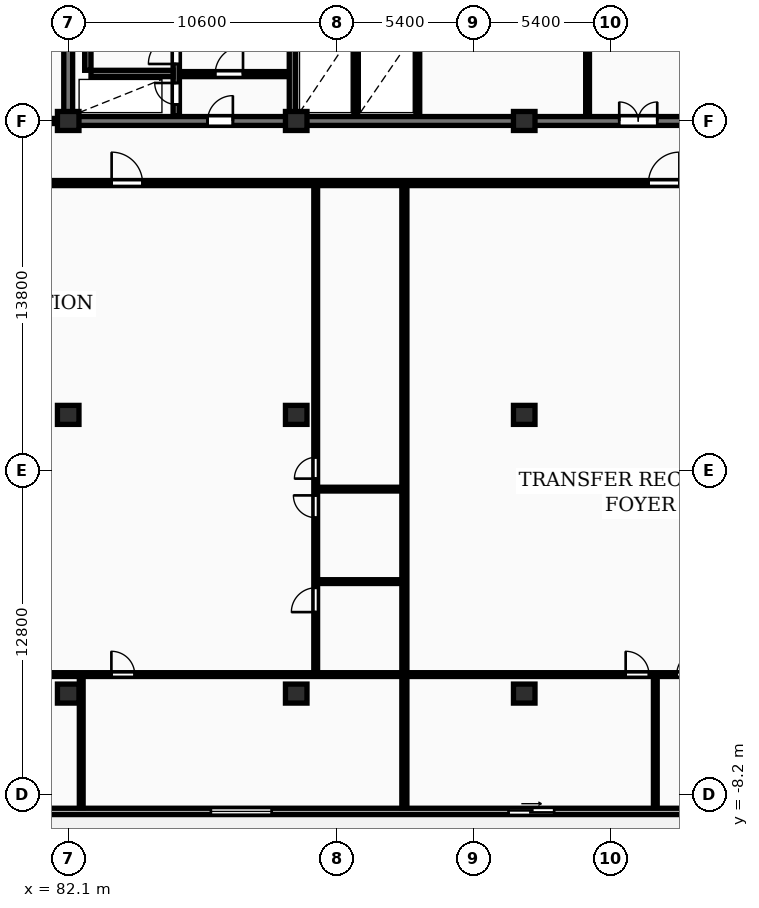
"""IFC4 building model, lengths in metres.
Left out: names, types, materials, properties, quantities, classifications, styles, units other than length and angle.
Written with IfcOpenShell. Run it as: python <this file> out.ifc"""

import sys

from ifc_helpers import new_model, si_unit, direction, frame, frame_2d, origin, origin_2d, place, context, subcontext, project, spatial, rectangle, extrude, element, fill, save


model = new_model("IFC4")
c1 = context("Model", 3, precision=1e-05, world=origin(), true_north=direction((0.0, 1.0)))
c2 = subcontext(c1, "Body", "Model", "MODEL_VIEW")
j1 = project(units=[si_unit("LENGTHUNIT", "METRE"), si_unit("PLANEANGLEUNIT", "RADIAN")], contexts=[c1])
p1 = place(None, origin())
s1 = spatial("IfcSite", under=j1, at=p1, CompositionType="ELEMENT")
p2 = place(p1, origin())
s2 = spatial("IfcBuilding", under=s1, at=p2, CompositionType="ELEMENT")
p3 = place(p2, frame((0.0, 0.0, 93.8)))
s3 = spatial("IfcBuildingStorey", under=s2, at=p3, CompositionType="ELEMENT", Elevation=93.8)
for number, where, z_axis, x_axis in (
    (1, (82.1, -4.2, 0.0), (0.0, 0.0, 1.0), (1.0, 0.0, 0.0)),
    (2, (82.1, 6.8, 0.0), (0.0, 0.0, 1.0), (1.0, 0.0, 0.0)),
    (3, (82.1, 18.4, 0.0), (0.0, 0.0, 1.0), (1.0, 0.0, 0.0)),
    (4, (91.1, -4.2, 0.0), (0.0, 0.0, 1.0), (1.0, 0.0, 0.0)),
    (5, (91.1, 6.8, 0.0), (0.0, 0.0, 1.0), (1.0, 0.0, 0.0)),
    (6, (91.1, 18.4, 0.0), (0.0, 0.0, 1.0), (1.0, 0.0, 0.0)),
    (7, (100.1, -4.2, 0.0), (0.0, 0.0, 1.0), (1.0, 0.0, 0.0)),
    (8, (100.1, 6.8, 0.0), (0.0, 0.0, 1.0), (1.0, 0.0, 0.0)),
    (9, (100.1, 18.4, 0.0), (0.0, 0.0, 1.0), (1.0, 0.0, 0.0)),
):
    element("IfcColumn", number, at=place(p3, frame(where, z_axis=z_axis, x_axis=x_axis)), inside=s3, PredefinedType="COLUMN", context=c2, shape_type="SweptSolid", body=[
        extrude(rectangle(XDim=0.85, YDim=0.75, at=origin_2d()), origin(), (0.0, 0.0, 1.0), 3.25),
    ])
p4 = place(p3, frame((72.7, -8.85, 0.0), z_axis=(0.0, 0.0, 1.0), x_axis=(1.0, 0.0, 0.0)))
e10 = element("IfcWall", 10, at=p4, inside=s3, PredefinedType="STANDARD", context=c2, shape_type="SweptSolid", body=[
    extrude(rectangle(XDim=58.0, YDim=0.25, at=frame_2d((29.0, 0.0))), origin(), (0.0, 0.0, 1.0), 2.97),
])
p5 = place(p4, frame((4.117, 0.0, 0.0)))
e11 = element("IfcOpeningElement", 11, at=p5, cuts=e10, PredefinedType="OPENING", context=c2, shape_type="SweptSolid", body=[
    extrude(rectangle(XDim=1.8, YDim=2.2, at=frame_2d((0.9, 1.1))), frame((0.0, 0.135, 0.0), z_axis=(0.0, -1.0, 0.0), x_axis=(1.0, 0.0, 0.0)), (0.0, 0.0, 1.0), 0.27),
])
p6 = place(p4, frame((15.032, 0.0, 0.85)))
e12 = element("IfcOpeningElement", 12, at=p6, cuts=e10, PredefinedType="OPENING", context=c2, shape_type="SweptSolid", body=[
    extrude(rectangle(XDim=2.4, YDim=1.9, at=frame_2d((1.2, 0.95))), frame((0.0, 0.135, 0.0), z_axis=(0.0, -1.0, 0.0), x_axis=(1.0, 0.0, 0.0)), (0.0, 0.0, 1.0), 0.27),
])
p7 = place(p4, frame((26.781, 0.0, 0.0)))
e13 = element("IfcOpeningElement", 13, at=p7, cuts=e10, PredefinedType="OPENING", context=c2, shape_type="SweptSolid", body=[
    extrude(rectangle(XDim=1.8, YDim=2.2, at=frame_2d((0.9, 1.1))), frame((0.0, 0.135, 0.0), z_axis=(0.0, -1.0, 0.0), x_axis=(1.0, 0.0, 0.0)), (0.0, 0.0, 1.0), 0.27),
])
p8 = place(p4, frame((37.571, 0.0, 0.85)))
e14 = element("IfcOpeningElement", 14, at=p8, cuts=e10, PredefinedType="OPENING", context=c2, shape_type="SweptSolid", body=[
    extrude(rectangle(XDim=2.4, YDim=1.9, at=frame_2d((1.2, 0.95))), frame((0.0, 0.135, 0.0), z_axis=(0.0, -1.0, 0.0), x_axis=(1.0, 0.0, 0.0)), (0.0, 0.0, 1.0), 0.27),
])
p9 = place(p4, frame((48.864, 0.0, 0.0)))
e15 = element("IfcOpeningElement", 15, at=p9, cuts=e10, PredefinedType="OPENING", context=c2, shape_type="SweptSolid", body=[
    extrude(rectangle(XDim=1.8, YDim=2.2, at=frame_2d((0.9, 1.1))), frame((0.0, 0.135, 0.0), z_axis=(0.0, -1.0, 0.0), x_axis=(1.0, 0.0, 0.0)), (0.0, 0.0, 1.0), 0.27),
])
p10 = place(p4, frame((54.9, 0.0, 0.85)))
e16 = element("IfcOpeningElement", 16, at=p10, cuts=e10, PredefinedType="OPENING", context=c2, shape_type="SweptSolid", body=[
    extrude(rectangle(XDim=2.4, YDim=1.9, at=frame_2d((1.2, 0.95))), frame((0.0, 0.135, 0.0), z_axis=(0.0, -1.0, 0.0), x_axis=(1.0, 0.0, 0.0)), (0.0, 0.0, 1.0), 0.27),
])
p11 = place(p3, frame((82.1, 18.575, 0.0), z_axis=(0.0, 0.0, 1.0), x_axis=(0.0, 1.0, 0.0)))
e17 = element("IfcWall", 17, at=p11, inside=s3, PredefinedType="SHEAR", context=c2, shape_type="SweptSolid", body=[
    extrude(rectangle(XDim=11.65, YDim=0.35, at=frame_2d((5.825, 0.0))), origin(), (0.0, 0.0, 1.0), 3.25),
])
p12 = place(p3, frame((81.925, 18.4, 0.0), z_axis=(0.0, 0.0, 1.0), x_axis=(1.0, 0.0, 0.0)))
e18 = element("IfcWall", 18, at=p12, inside=s3, PredefinedType="SHEAR", context=c2, shape_type="SweptSolid", body=[
    extrude(rectangle(XDim=36.265, YDim=0.35, at=frame_2d((18.132, 0.0))), origin(), (0.0, 0.0, 1.0), 3.25),
])
p13 = place(p12, frame((5.675, 0.0, 0.0)))
e19 = element("IfcOpeningElement", 19, at=p13, cuts=e18, PredefinedType="OPENING", context=c2, shape_type="SweptSolid", body=[
    extrude(rectangle(XDim=1.0, YDim=2.15, at=frame_2d((0.5, 1.075))), frame((0.0, 0.185, 0.0), z_axis=(0.0, -1.0, 0.0), x_axis=(1.0, 0.0, 0.0)), (0.0, 0.0, 1.0), 0.37),
])
p14 = place(p12, frame((21.925, 0.0, 0.0)))
e20 = element("IfcOpeningElement", 20, at=p14, cuts=e18, PredefinedType="OPENING", context=c2, shape_type="SweptSolid", body=[
    extrude(rectangle(XDim=1.5, YDim=2.2, at=frame_2d((0.75, 1.1))), frame((0.0, 0.185, 0.0), z_axis=(0.0, -1.0, 0.0), x_axis=(1.0, 0.0, 0.0)), (0.0, 0.0, 1.0), 0.37),
])
p15 = place(p12, frame((29.875, 0.0, 0.0)))
e21 = element("IfcOpeningElement", 21, at=p15, cuts=e18, PredefinedType="OPENING", context=c2, shape_type="SweptSolid", body=[
    extrude(rectangle(XDim=1.0, YDim=2.15, at=frame_2d((0.5, 1.075))), frame((0.0, 0.185, 0.0), z_axis=(0.0, -1.0, 0.0), x_axis=(1.0, 0.0, 0.0)), (0.0, 0.0, 1.0), 0.37),
])
p16 = place(p3, frame((82.875, 20.4, 0.0), z_axis=(0.0, 0.0, 1.0), x_axis=(0.0, 1.0, 0.0)))
e22 = element("IfcWall", 22, at=p16, inside=s3, PredefinedType="SHEAR", context=c2, shape_type="SweptSolid", body=[
    extrude(rectangle(XDim=7.6, YDim=0.25, at=frame_2d((3.8, 0.0))), origin(), (0.0, 0.0, 1.0), 3.25),
])
p17 = place(p3, frame((86.365, 18.6, 0.0), z_axis=(0.0, 0.0, 1.0), x_axis=(0.0, 1.0, 0.0)))
e23 = element("IfcWall", 23, at=p17, inside=s3, PredefinedType="SHEAR", context=c2, shape_type="SweptSolid", body=[
    extrude(rectangle(XDim=11.6, YDim=0.25, at=frame_2d((5.8, 0.0))), origin(), (0.0, 0.0, 1.0), 3.25),
])
p18 = place(p17, frame((0.45, 0.0, 0.0)))
e24 = element("IfcOpeningElement", 24, at=p18, cuts=e23, PredefinedType="OPENING", context=c2, shape_type="SweptSolid", body=[
    extrude(rectangle(XDim=0.85, YDim=2.05, at=frame_2d((0.425, 1.025))), frame((0.0, 0.135, 0.0), z_axis=(0.0, -1.0, 0.0), x_axis=(1.0, 0.0, 0.0)), (0.0, 0.0, 1.0), 0.27),
])
p19 = place(p17, frame((2.05, 0.0, 0.0)))
e25 = element("IfcOpeningElement", 25, at=p19, cuts=e23, PredefinedType="OPENING", context=c2, shape_type="SweptSolid", body=[
    extrude(rectangle(XDim=1.1, YDim=2.1, at=frame_2d((0.55, 1.05))), frame((0.0, 0.135, 0.0), z_axis=(0.0, -1.0, 0.0), x_axis=(1.0, 0.0, 0.0)), (0.0, 0.0, 1.0), 0.27),
])
p20 = place(p17, frame((9.95, 0.0, 0.0)))
e26 = element("IfcOpeningElement", 26, at=p20, cuts=e23, PredefinedType="OPENING", context=c2, shape_type="SweptSolid", body=[
    extrude(rectangle(XDim=0.85, YDim=2.05, at=frame_2d((0.425, 1.025))), frame((0.0, 0.135, 0.0), z_axis=(0.0, -1.0, 0.0), x_axis=(1.0, 0.0, 0.0)), (0.0, 0.0, 1.0), 0.27),
])
p21 = place(p3, frame((83.0, 20.275, 0.0), z_axis=(0.0, 0.0, 1.0), x_axis=(1.0, 0.0, 0.0)))
e27 = element("IfcWall", 27, at=p21, inside=s3, PredefinedType="SHEAR", context=c2, shape_type="SweptSolid", body=[
    extrude(rectangle(XDim=3.24, YDim=0.25, at=frame_2d((1.62, 0.0))), origin(), (0.0, 0.0, 1.0), 3.25),
])
p22 = place(p3, frame((86.5, 20.25, 0.0), z_axis=(0.0, 0.0, 1.0), x_axis=(1.0, 0.0, 0.0)))
e28 = element("IfcWall", 28, at=p22, inside=s3, PredefinedType="PARTITIONING", context=c2, shape_type="SweptSolid", body=[
    extrude(rectangle(XDim=4.32, YDim=0.2, at=frame_2d((2.16, 0.0))), origin(), (0.0, 0.0, 1.0), 2.97),
])
p23 = place(p22, frame((1.4, 0.0, 0.0)))
e29 = element("IfcOpeningElement", 29, at=p23, cuts=e28, PredefinedType="OPENING", context=c2, shape_type="SweptSolid", body=[
    extrude(rectangle(XDim=1.1, YDim=2.1, at=frame_2d((0.55, 1.05))), frame((0.0, 0.11, 0.0), z_axis=(0.0, -1.0, 0.0), x_axis=(1.0, 0.0, 0.0)), (0.0, 0.0, 1.0), 0.22),
])
p24 = place(p3, frame((90.95, 18.6, 0.0), z_axis=(0.0, 0.0, 1.0), x_axis=(0.0, 1.0, 0.0)))
e30 = element("IfcWall", 30, at=p24, inside=s3, PredefinedType="SHEAR", context=c2, shape_type="SweptSolid", body=[
    extrude(rectangle(XDim=11.6, YDim=0.25, at=frame_2d((5.8, 0.0))), origin(), (0.0, 0.0, 1.0), 3.25),
])
p25 = place(p24, frame((4.6, 0.0, 0.0)))
e31 = element("IfcOpeningElement", 31, at=p25, cuts=e30, PredefinedType="OPENING", context=c2, shape_type="SweptSolid", body=[
    extrude(rectangle(XDim=1.1, YDim=2.1, at=frame_2d((0.55, 1.05))), frame((0.0, 0.135, 0.0), z_axis=(0.0, -1.0, 0.0), x_axis=(1.0, 0.0, 0.0)), (0.0, 0.0, 1.0), 0.27),
])
for number, where, z_axis, x_axis in (
    (32, (93.45, 18.6, 0.0), (0.0, 0.0, 1.0), (0.0, 1.0, 0.0)),
    (33, (95.9, 18.6, 0.0), (0.0, 0.0, 1.0), (0.0, 1.0, 0.0)),
    (34, (102.6, 18.6, 0.0), (0.0, 0.0, 1.0), (0.0, 1.0, 0.0)),
):
    element("IfcWall", number, at=place(p3, frame(where, z_axis=z_axis, x_axis=x_axis)), inside=s3, PredefinedType="PARTITIONING", context=c2, shape_type="SweptSolid", body=[
        extrude(rectangle(XDim=3.6, YDim=0.15, at=frame_2d((1.8, 0.0))), origin(), (0.0, 0.0, 1.0), 2.97),
    ])
p26 = place(p3, frame((72.7, 18.4, 0.0), z_axis=(0.0, 0.0, 1.0), x_axis=(1.0, 0.0, 0.0)))
e35 = element("IfcWall", 35, at=p26, inside=s3, PredefinedType="PARTITIONING", context=c2, shape_type="SweptSolid", body=[
    extrude(rectangle(XDim=9.25, YDim=0.2, at=frame_2d((4.625, 0.0))), origin(), (0.0, 0.0, 1.0), 2.358),
])
p27 = place(p26, frame((4.15, 0.0, 0.0)))
e36 = element("IfcOpeningElement", 36, at=p27, cuts=e35, PredefinedType="OPENING", context=c2, shape_type="SweptSolid", body=[
    extrude(rectangle(XDim=0.95, YDim=2.15, at=frame_2d((0.475, 1.075))), frame((0.0, 0.11, 0.0), z_axis=(0.0, -1.0, 0.0), x_axis=(1.0, 0.0, 0.0)), (0.0, 0.0, 1.0), 0.22),
])
p28 = place(p3, frame((95.369, -8.7, 0.0), z_axis=(0.0, 0.0, 1.0), x_axis=(0.0, 1.0, 0.0)))
e37 = element("IfcWall", 37, at=p28, inside=s3, PredefinedType="PARTITIONING", context=c2, shape_type="SweptSolid", body=[
    extrude(rectangle(XDim=24.57, YDim=0.2, at=frame_2d((12.285, 0.0))), origin(), (0.0, 0.0, 1.0), 2.97),
])
for number, where, z_axis, x_axis in (
    (38, (91.929, 0.22, 0.0), (0.0, 0.0, 1.0), (1.0, 0.0, 0.0)),
    (39, (91.929, 3.87, 0.0), (0.0, 0.0, 1.0), (1.0, 0.0, 0.0)),
):
    element("IfcWall", number, at=place(p3, frame(where, z_axis=z_axis, x_axis=x_axis)), inside=s3, PredefinedType="PARTITIONING", context=c2, shape_type="SweptSolid", body=[
        extrude(rectangle(XDim=3.36, YDim=0.15, at=frame_2d((1.68, 0.0))), origin(), (0.0, 0.0, 1.0), 2.97),
    ])
p29 = place(p3, frame((91.869, -3.39, 0.0), z_axis=(0.0, 0.0, 1.0), x_axis=(0.0, 1.0, 0.0)))
e40 = element("IfcWall", 40, at=p29, inside=s3, PredefinedType="PARTITIONING", context=c2, shape_type="SweptSolid", body=[
    extrude(rectangle(XDim=19.28, YDim=0.15, at=frame_2d((9.64, 0.0))), origin(), (0.0, 0.0, 1.0), 2.97),
])
p30 = place(p29, frame((2.406, 0.0, 0.0)))
e41 = element("IfcOpeningElement", 41, at=p30, cuts=e40, PredefinedType="OPENING", context=c2, shape_type="SweptSolid", body=[
    extrude(rectangle(XDim=0.96, YDim=2.1, at=frame_2d((0.48, 1.05))), frame((0.0, 0.085, 0.0), z_axis=(0.0, -1.0, 0.0), x_axis=(1.0, 0.0, 0.0)), (0.0, 0.0, 1.0), 0.17),
])
p31 = place(p29, frame((6.133, 0.0, 0.0)))
e42 = element("IfcOpeningElement", 42, at=p31, cuts=e40, PredefinedType="OPENING", context=c2, shape_type="SweptSolid", body=[
    extrude(rectangle(XDim=0.88, YDim=2.06, at=frame_2d((0.44, 1.03))), frame((0.0, 0.085, 0.0), z_axis=(0.0, -1.0, 0.0), x_axis=(1.0, 0.0, 0.0)), (0.0, 0.0, 1.0), 0.17),
])
p32 = place(p29, frame((7.674, 0.0, 0.0)))
e43 = element("IfcOpeningElement", 43, at=p32, cuts=e40, PredefinedType="OPENING", context=c2, shape_type="SweptSolid", body=[
    extrude(rectangle(XDim=0.84, YDim=2.04, at=frame_2d((0.42, 1.02))), frame((0.0, 0.085, 0.0), z_axis=(0.0, -1.0, 0.0), x_axis=(1.0, 0.0, 0.0)), (0.0, 0.0, 1.0), 0.17),
])
p33 = place(p3, frame((82.615, -8.7, 0.0), z_axis=(0.0, 0.0, 1.0), x_axis=(0.0, 1.0, 0.0)))
e44 = element("IfcWall", 44, at=p33, inside=s3, PredefinedType="PARTITIONING", context=c2, shape_type="SweptSolid", body=[
    extrude(rectangle(XDim=5.17, YDim=0.15, at=frame_2d((2.585, 0.0))), origin(), (0.0, 0.0, 1.0), 2.97),
])
p34 = place(p3, frame((72.78, -3.45, 0.0), z_axis=(0.0, 0.0, 1.0), x_axis=(1.0, 0.0, 0.0)))
e45 = element("IfcWall", 45, at=p34, inside=s3, PredefinedType="PARTITIONING", context=c2, shape_type="SweptSolid", body=[
    extrude(rectangle(XDim=22.509, YDim=0.15, at=frame_2d((11.254, 0.0))), origin(), (0.0, 0.0, 1.0), 2.97),
])
p35 = place(p34, frame((6.645, 0.0, 0.0)))
e46 = element("IfcOpeningElement", 46, at=p35, cuts=e45, PredefinedType="OPENING", context=c2, shape_type="SweptSolid", body=[
    extrude(rectangle(XDim=0.92, YDim=2.08, at=frame_2d((0.46, 1.04))), frame((0.0, 0.085, 0.0), z_axis=(0.0, -1.0, 0.0), x_axis=(1.0, 0.0, 0.0)), (0.0, 0.0, 1.0), 0.17),
])
p36 = place(p34, frame((11.024, 0.0, 0.0)))
e47 = element("IfcOpeningElement", 47, at=p36, cuts=e45, PredefinedType="OPENING", context=c2, shape_type="SweptSolid", body=[
    extrude(rectangle(XDim=0.92, YDim=2.08, at=frame_2d((0.46, 1.04))), frame((0.0, 0.085, 0.0), z_axis=(0.0, -1.0, 0.0), x_axis=(1.0, 0.0, 0.0)), (0.0, 0.0, 1.0), 0.17),
])
p37 = place(p3, frame((105.274, -8.7, 0.0), z_axis=(0.0, 0.0, 1.0), x_axis=(0.0, 1.0, 0.0)))
e48 = element("IfcWall", 48, at=p37, inside=s3, PredefinedType="PARTITIONING", context=c2, shape_type="SweptSolid", body=[
    extrude(rectangle(XDim=5.17, YDim=0.15, at=frame_2d((2.585, 0.0))), origin(), (0.0, 0.0, 1.0), 2.97),
])
p38 = place(p3, frame((95.449, -3.45, 0.0), z_axis=(0.0, 0.0, 1.0), x_axis=(1.0, 0.0, 0.0)))
e49 = element("IfcWall", 49, at=p38, inside=s3, PredefinedType="PARTITIONING", context=c2, shape_type="SweptSolid", body=[
    extrude(rectangle(XDim=22.26, YDim=0.15, at=frame_2d((11.13, 0.0))), origin(), (0.0, 0.0, 1.0), 2.97),
])
p39 = place(p38, frame((8.655, 0.0, 0.0)))
e50 = element("IfcOpeningElement", 50, at=p39, cuts=e49, PredefinedType="OPENING", context=c2, shape_type="SweptSolid", body=[
    extrude(rectangle(XDim=0.92, YDim=2.08, at=frame_2d((0.46, 1.04))), frame((0.0, 0.085, 0.0), z_axis=(0.0, -1.0, 0.0), x_axis=(1.0, 0.0, 0.0)), (0.0, 0.0, 1.0), 0.17),
])
p40 = place(p38, frame((10.67, 0.0, 0.0)))
e51 = element("IfcOpeningElement", 51, at=p40, cuts=e49, PredefinedType="OPENING", context=c2, shape_type="SweptSolid", body=[
    extrude(rectangle(XDim=0.92, YDim=2.08, at=frame_2d((0.46, 1.04))), frame((0.0, 0.085, 0.0), z_axis=(0.0, -1.0, 0.0), x_axis=(1.0, 0.0, 0.0)), (0.0, 0.0, 1.0), 0.17),
])
p41 = place(p3, frame((72.7, 15.95, 0.0), z_axis=(0.0, 0.0, 1.0), x_axis=(1.0, 0.0, 0.0)))
e52 = element("IfcWall", 52, at=p41, inside=s3, PredefinedType="PARTITIONING", context=c2, shape_type="SweptSolid", body=[
    extrude(rectangle(XDim=58.0, YDim=0.2, at=frame_2d((29.0, 0.0))), origin(), (0.0, 0.0, 1.0), 2.97),
])
p42 = place(p41, frame((11.114, 0.0, 0.0)))
e53 = element("IfcOpeningElement", 53, at=p42, cuts=e52, PredefinedType="OPENING", context=c2, shape_type="SweptSolid", body=[
    extrude(rectangle(XDim=1.22, YDim=2.18, at=frame_2d((0.61, 1.09))), frame((0.0, 0.11, 0.0), z_axis=(0.0, -1.0, 0.0), x_axis=(1.0, 0.0, 0.0)), (0.0, 0.0, 1.0), 0.22),
])
p43 = place(p41, frame((32.304, 0.0, 0.0)))
e54 = element("IfcOpeningElement", 54, at=p43, cuts=e52, PredefinedType="OPENING", context=c2, shape_type="SweptSolid", body=[
    extrude(rectangle(XDim=1.22, YDim=2.18, at=frame_2d((0.61, 1.09))), frame((0.0, 0.11, 0.0), z_axis=(0.0, -1.0, 0.0), x_axis=(1.0, 0.0, 0.0)), (0.0, 0.0, 1.0), 0.22),
])
p44 = place(p41, frame((47.134, 0.0, 0.0)))
e55 = element("IfcOpeningElement", 55, at=p44, cuts=e52, PredefinedType="OPENING", context=c2, shape_type="SweptSolid", body=[
    extrude(rectangle(XDim=0.95, YDim=2.15, at=frame_2d((0.475, 1.075))), frame((0.0, 0.11, 0.0), z_axis=(0.0, -1.0, 0.0), x_axis=(1.0, 0.0, 0.0)), (0.0, 0.0, 1.0), 0.22),
])
p45 = place(p6, origin())
e56 = element("IfcWindow", 56, at=p45, inside=s3, PartitioningType="DOUBLE_PANEL_VERTICAL", PredefinedType="WINDOW", context=c2, shape_type="SweptSolid", body=[
    extrude(rectangle(XDim=2.4, YDim=1.9, at=frame_2d((1.2, 0.95))), frame((0.0, 0.03, 0.0), z_axis=(0.0, -1.0, 0.0), x_axis=(1.0, 0.0, 0.0)), (0.0, 0.0, 1.0), 0.06),
])
fill(e12, e56)
p46 = place(p7, origin())
e57 = element("IfcDoor", 57, at=p46, inside=s3, OperationType="SLIDING_TO_RIGHT", PredefinedType="DOOR", context=c2, shape_type="SweptSolid", body=[
    extrude(rectangle(XDim=1.8, YDim=2.2, at=frame_2d((0.9, 1.1))), frame((0.0, 0.025, 0.0), z_axis=(0.0, -1.0, 0.0), x_axis=(1.0, 0.0, 0.0)), (0.0, 0.0, 1.0), 0.05),
])
fill(e13, e57)
p47 = place(p13, origin())
e58 = element("IfcDoor", 58, at=p47, inside=s3, OperationType="SINGLE_SWING_RIGHT", PredefinedType="DOOR", context=c2, shape_type="SweptSolid", body=[
    extrude(rectangle(XDim=1.0, YDim=2.15, at=frame_2d((0.5, 1.075))), frame((0.0, 0.025, 0.0), z_axis=(0.0, -1.0, 0.0), x_axis=(1.0, 0.0, 0.0)), (0.0, 0.0, 1.0), 0.05),
])
fill(e19, e58)
p48 = place(p14, origin())
e59 = element("IfcDoor", 59, at=p48, inside=s3, OperationType="DOUBLE_DOOR_SINGLE_SWING", PredefinedType="DOOR", context=c2, shape_type="SweptSolid", body=[
    extrude(rectangle(XDim=1.5, YDim=2.2, at=frame_2d((0.75, 1.1))), frame((0.0, 0.025, 0.0), z_axis=(0.0, -1.0, 0.0), x_axis=(1.0, 0.0, 0.0)), (0.0, 0.0, 1.0), 0.05),
])
fill(e20, e59)
p49 = place(p18, origin())
e60 = element("IfcDoor", 60, at=p49, inside=s3, OperationType="SINGLE_SWING_RIGHT", PredefinedType="DOOR", context=c2, shape_type="SweptSolid", body=[
    extrude(rectangle(XDim=0.85, YDim=2.05, at=frame_2d((0.425, 1.025))), frame((0.0, 0.025, 0.0), z_axis=(0.0, -1.0, 0.0), x_axis=(1.0, 0.0, 0.0)), (0.0, 0.0, 1.0), 0.05),
])
fill(e24, e60)
p50 = place(p19, origin())
e61 = element("IfcDoor", 61, at=p50, inside=s3, OperationType="SINGLE_SWING_LEFT", PredefinedType="DOOR", context=c2, shape_type="SweptSolid", body=[
    extrude(rectangle(XDim=1.1, YDim=2.1, at=frame_2d((0.55, 1.05))), frame((0.0, 0.025, 0.0), z_axis=(0.0, -1.0, 0.0), x_axis=(1.0, 0.0, 0.0)), (0.0, 0.0, 1.0), 0.05),
])
fill(e25, e61)
p51 = place(p23, origin())
e62 = element("IfcDoor", 62, at=p51, inside=s3, OperationType="SINGLE_SWING_RIGHT", PredefinedType="DOOR", context=c2, shape_type="SweptSolid", body=[
    extrude(rectangle(XDim=1.1, YDim=2.1, at=frame_2d((0.55, 1.05))), frame((0.0, 0.025, 0.0), z_axis=(0.0, -1.0, 0.0), x_axis=(1.0, 0.0, 0.0)), (0.0, 0.0, 1.0), 0.05),
])
fill(e29, e62)
p52 = place(p30, origin())
e63 = element("IfcDoor", 63, at=p52, inside=s3, OperationType="SINGLE_SWING_LEFT", PredefinedType="DOOR", context=c2, shape_type="SweptSolid", body=[
    extrude(rectangle(XDim=0.96, YDim=2.1, at=frame_2d((0.48, 1.05))), frame((0.0, 0.025, 0.0), z_axis=(0.0, -1.0, 0.0), x_axis=(1.0, 0.0, 0.0)), (0.0, 0.0, 1.0), 0.05),
])
fill(e41, e63)
p53 = place(p31, origin())
e64 = element("IfcDoor", 64, at=p53, inside=s3, OperationType="SINGLE_SWING_RIGHT", PredefinedType="DOOR", context=c2, shape_type="SweptSolid", body=[
    extrude(rectangle(XDim=0.88, YDim=2.06, at=frame_2d((0.44, 1.03))), frame((0.0, 0.025, 0.0), z_axis=(0.0, -1.0, 0.0), x_axis=(1.0, 0.0, 0.0)), (0.0, 0.0, 1.0), 0.05),
])
fill(e42, e64)
p54 = place(p32, origin())
e65 = element("IfcDoor", 65, at=p54, inside=s3, OperationType="SINGLE_SWING_LEFT", PredefinedType="DOOR", context=c2, shape_type="SweptSolid", body=[
    extrude(rectangle(XDim=0.84, YDim=2.04, at=frame_2d((0.42, 1.02))), frame((0.0, 0.025, 0.0), z_axis=(0.0, -1.0, 0.0), x_axis=(1.0, 0.0, 0.0)), (0.0, 0.0, 1.0), 0.05),
])
fill(e43, e65)
p55 = place(p36, origin())
e66 = element("IfcDoor", 66, at=p55, inside=s3, OperationType="SINGLE_SWING_LEFT", PredefinedType="DOOR", context=c2, shape_type="SweptSolid", body=[
    extrude(rectangle(XDim=0.92, YDim=2.08, at=frame_2d((0.46, 1.04))), frame((0.0, 0.025, 0.0), z_axis=(0.0, -1.0, 0.0), x_axis=(1.0, 0.0, 0.0)), (0.0, 0.0, 1.0), 0.05),
])
fill(e47, e66)
p56 = place(p39, origin())
e67 = element("IfcDoor", 67, at=p56, inside=s3, OperationType="SINGLE_SWING_LEFT", PredefinedType="DOOR", context=c2, shape_type="SweptSolid", body=[
    extrude(rectangle(XDim=0.92, YDim=2.08, at=frame_2d((0.46, 1.04))), frame((0.0, 0.025, 0.0), z_axis=(0.0, -1.0, 0.0), x_axis=(1.0, 0.0, 0.0)), (0.0, 0.0, 1.0), 0.05),
])
fill(e50, e67)
p57 = place(p40, origin())
e68 = element("IfcDoor", 68, at=p57, inside=s3, OperationType="SINGLE_SWING_RIGHT", PredefinedType="DOOR", context=c2, shape_type="SweptSolid", body=[
    extrude(rectangle(XDim=0.92, YDim=2.08, at=frame_2d((0.46, 1.04))), frame((0.0, 0.025, 0.0), z_axis=(0.0, -1.0, 0.0), x_axis=(1.0, 0.0, 0.0)), (0.0, 0.0, 1.0), 0.05),
])
fill(e51, e68)
p58 = place(p42, origin())
e69 = element("IfcDoor", 69, at=p58, inside=s3, OperationType="SINGLE_SWING_LEFT", PredefinedType="DOOR", context=c2, shape_type="SweptSolid", body=[
    extrude(rectangle(XDim=1.22, YDim=2.18, at=frame_2d((0.61, 1.09))), frame((0.0, 0.025, 0.0), z_axis=(0.0, -1.0, 0.0), x_axis=(1.0, 0.0, 0.0)), (0.0, 0.0, 1.0), 0.05),
])
fill(e53, e69)
p59 = place(p43, origin())
e70 = element("IfcDoor", 70, at=p59, inside=s3, OperationType="SINGLE_SWING_RIGHT", PredefinedType="DOOR", context=c2, shape_type="SweptSolid", body=[
    extrude(rectangle(XDim=1.22, YDim=2.18, at=frame_2d((0.61, 1.09))), frame((0.0, 0.025, 0.0), z_axis=(0.0, -1.0, 0.0), x_axis=(1.0, 0.0, 0.0)), (0.0, 0.0, 1.0), 0.05),
])
fill(e54, e70)
save(model, sys.argv[1])
